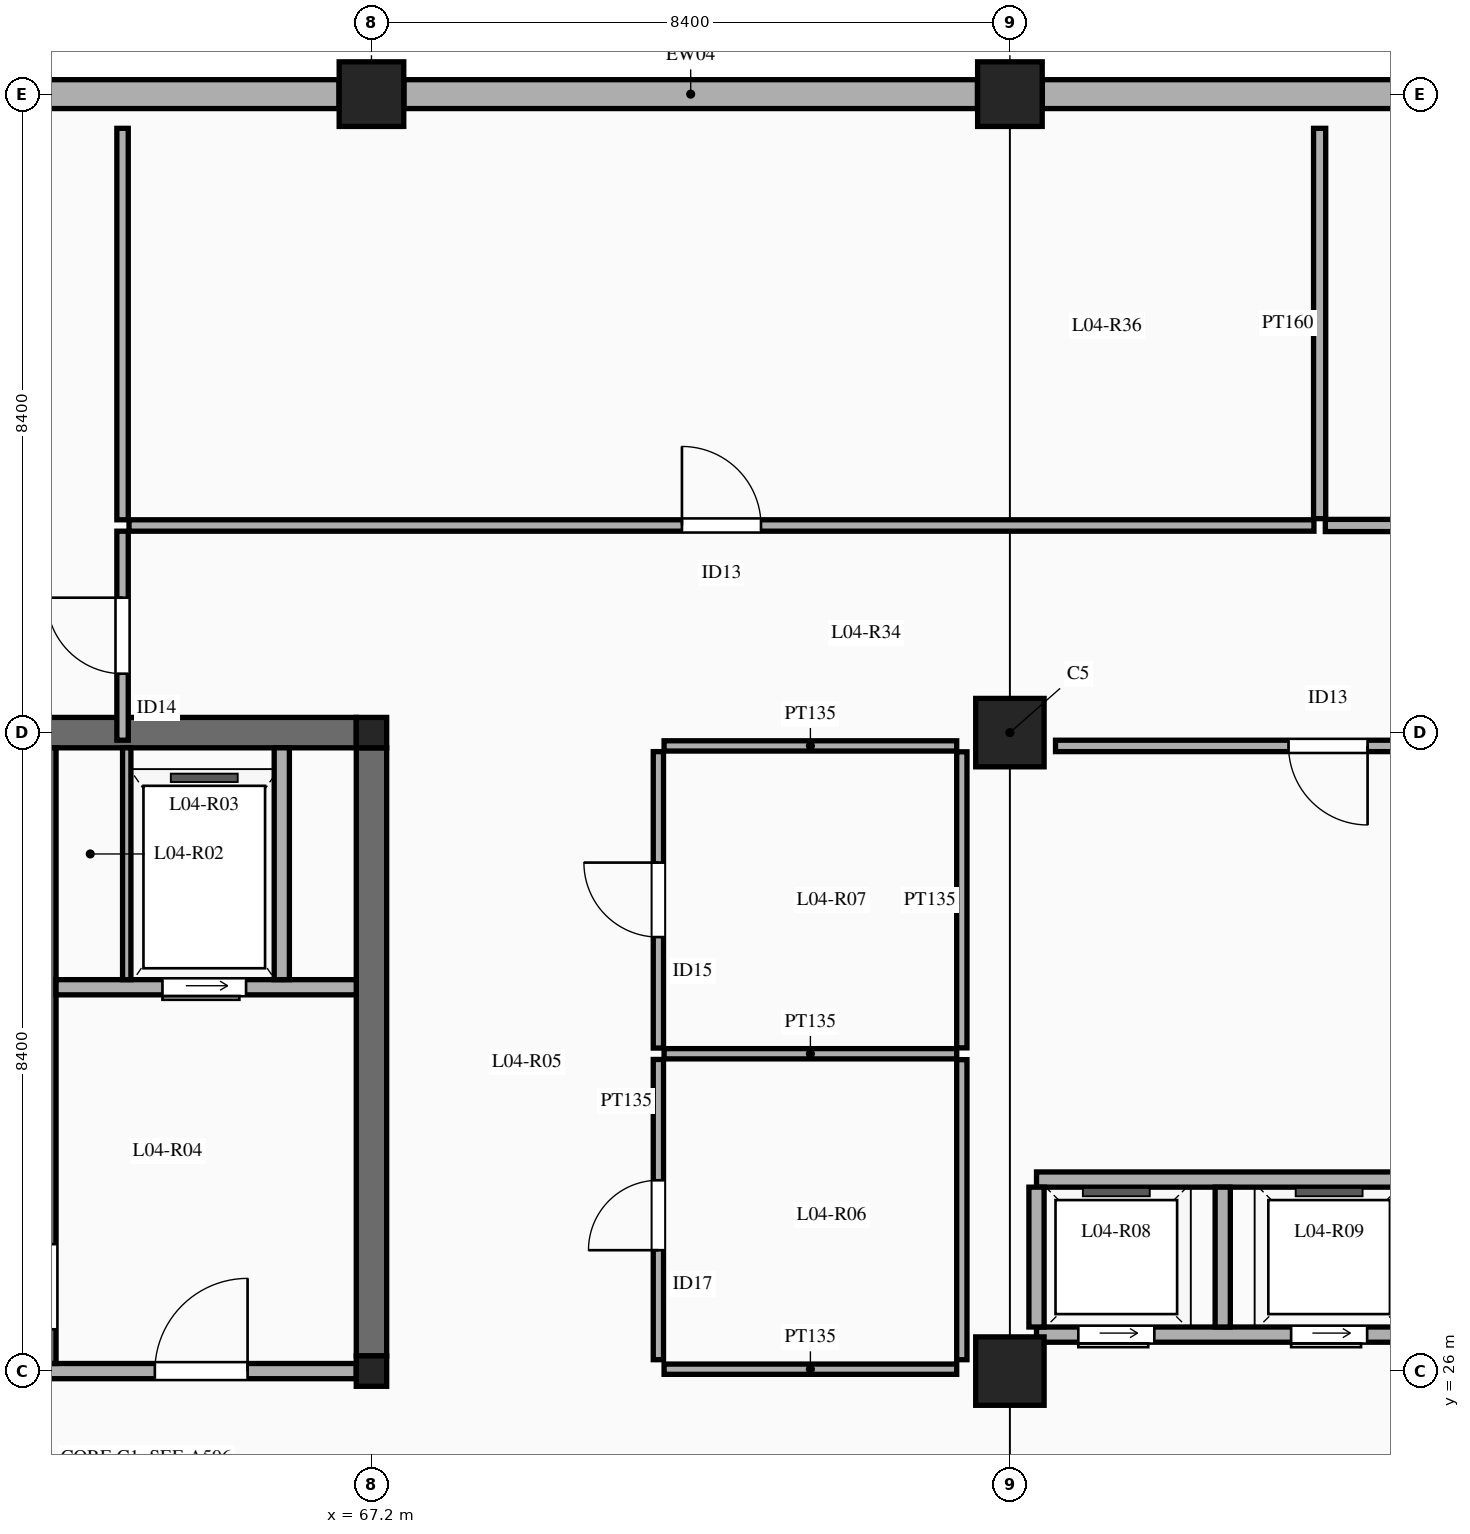
"""IFC4 building model, lengths in metres.
Left out: names, types, materials, properties, quantities, classifications, styles, units other than length and angle.
Written with IfcOpenShell. Run it as: python <this file> out.ifc"""

import sys

from ifc_helpers import new_model, si_unit, direction, frame, frame_2d, origin, origin_2d, place, context, subcontext, project, spatial, rectangle, extrude, element, fill, save


model = new_model("IFC4")
c1 = context("Model", 3, precision=1e-05, world=origin(), true_north=direction((0.0, 1.0)))
c2 = subcontext(c1, "Body", "Model", "MODEL_VIEW")
j1 = project(units=[si_unit("LENGTHUNIT", "METRE"), si_unit("PLANEANGLEUNIT", "RADIAN")], contexts=[c1])
p1 = place(None, origin())
s1 = spatial("IfcSite", under=j1, at=p1, CompositionType="ELEMENT")
p2 = place(p1, origin())
s2 = spatial("IfcBuilding", under=s1, at=p2, CompositionType="ELEMENT")
p3 = place(p2, frame((0.0, 0.0, 19.5)))
s3 = spatial("IfcBuildingStorey", under=s2, at=p3, CompositionType="ELEMENT", Elevation=19.5)
for number, where, z_axis, x_axis in (
    (1, (67.2, 26.0, 0.0), (0.0, 0.0, 1.0), (1.0, 0.0, 0.0)),
    (2, (67.2, 34.4, 0.0), (0.0, 0.0, 1.0), (1.0, 0.0, 0.0)),
):
    element("IfcColumn", number, at=place(p3, frame(where, z_axis=z_axis, x_axis=x_axis)), inside=s3, PredefinedType="COLUMN", context=c2, shape_type="SweptSolid", body=[
        extrude(rectangle(XDim=0.4, YDim=0.4, at=origin_2d()), origin(), (0.0, 0.0, 1.0), 4.5),
    ])
p4 = place(p3, frame((67.2, 42.8, 0.0), z_axis=(0.0, 0.0, 1.0), x_axis=(1.0, 0.0, 0.0)))
e3 = element("IfcColumn", 3, at=p4, inside=s3, PredefinedType="COLUMN", context=c2, shape_type="SweptSolid", body=[
    extrude(rectangle(XDim=0.85, YDim=0.85, at=origin_2d()), origin(), (0.0, 0.0, 1.0), 4.5),
])
for number, where, z_axis, x_axis in (
    (4, (75.6, 26.0, 0.0), (0.0, 0.0, 1.0), (1.0, 0.0, 0.0)),
    (5, (75.6, 34.4, 0.0), (0.0, 0.0, 1.0), (1.0, 0.0, 0.0)),
):
    element("IfcColumn", number, at=place(p3, frame(where, z_axis=z_axis, x_axis=x_axis)), inside=s3, PredefinedType="COLUMN", context=c2, shape_type="SweptSolid", body=[
        extrude(rectangle(XDim=0.9, YDim=0.9, at=origin_2d()), origin(), (0.0, 0.0, 1.0), 4.5),
    ])
p5 = place(p3, frame((75.6, 42.8, 0.0), z_axis=(0.0, 0.0, 1.0), x_axis=(1.0, 0.0, 0.0)))
e6 = element("IfcColumn", 6, at=p5, inside=s3, PredefinedType="COLUMN", context=c2, shape_type="SweptSolid", body=[
    extrude(rectangle(XDim=0.85, YDim=0.85, at=origin_2d()), origin(), (0.0, 0.0, 1.0), 4.5),
])
for number, where, z_axis, x_axis in (
    (7, (67.2, 26.2, 0.0), (0.0, 0.0, 1.0), (0.0, 1.0, 0.0)),
    (8, (59.0, 34.4, 0.0), (0.0, 0.0, 1.0), (1.0, 0.0, 0.0)),
):
    element("IfcWall", number, at=place(p3, frame(where, z_axis=z_axis, x_axis=x_axis)), inside=s3, PredefinedType="SHEAR", context=c2, shape_type="SweptSolid", body=[
        extrude(rectangle(XDim=8.0, YDim=0.4, at=frame_2d((4.0, 0.0))), origin(), (0.0, 0.0, 1.0), 4.5),
    ])
p6 = place(p3, frame((59.227, 42.8, 0.0), z_axis=(0.0, 0.0, 1.0), x_axis=(1.0, 0.0, 0.0)))
e9 = element("IfcWall", 9, at=p6, inside=s3, PredefinedType="SOLIDWALL", context=c2, shape_type="SweptSolid", body=[
    extrude(rectangle(XDim=7.546, YDim=0.38, at=frame_2d((3.773, 0.0))), origin(), (0.0, 0.0, 1.0), 3.55),
])
p7 = place(p3, frame((67.627, 42.8, 0.0), z_axis=(0.0, 0.0, 1.0), x_axis=(1.0, 0.0, 0.0)))
e10 = element("IfcWall", 10, at=p7, inside=s3, PredefinedType="SOLIDWALL", context=c2, shape_type="SweptSolid", body=[
    extrude(rectangle(XDim=7.546, YDim=0.38, at=frame_2d((3.773, 0.0))), origin(), (0.0, 0.0, 1.0), 3.55),
])
p8 = place(p3, frame((76.027, 42.8, 0.0), z_axis=(0.0, 0.0, 1.0), x_axis=(1.0, 0.0, 0.0)))
e11 = element("IfcWall", 11, at=p8, inside=s3, PredefinedType="SOLIDWALL", context=c2, shape_type="SweptSolid", body=[
    extrude(rectangle(XDim=7.546, YDim=0.38, at=frame_2d((3.773, 0.0))), origin(), (0.0, 0.0, 1.0), 3.55),
])
p9 = place(p3, frame((59.0, 26.0, 0.0), z_axis=(0.0, 0.0, 1.0), x_axis=(1.0, 0.0, 0.0)))
e12 = element("IfcWall", 12, at=p9, inside=s3, PredefinedType="SOLIDWALL", context=c2, shape_type="SweptSolid", body=[
    extrude(rectangle(XDim=8.0, YDim=0.2, at=frame_2d((4.0, 0.0))), origin(), (0.0, 0.0, 1.0), 3.53),
])
p10 = place(p9, frame((1.55, 0.0, 0.0)))
e13 = element("IfcOpeningElement", 13, at=p10, cuts=e12, PredefinedType="OPENING", context=c2, shape_type="SweptSolid", body=[
    extrude(rectangle(XDim=1.15, YDim=2.15, at=frame_2d((0.575, 1.075))), frame((0.0, 0.11, 0.0), z_axis=(0.0, -1.0, 0.0), x_axis=(1.0, 0.0, 0.0)), (0.0, 0.0, 1.0), 0.22),
])
p11 = place(p9, frame((5.35, 0.0, 0.0)))
e14 = element("IfcOpeningElement", 14, at=p11, cuts=e12, PredefinedType="OPENING", context=c2, shape_type="SweptSolid", body=[
    extrude(rectangle(XDim=1.22, YDim=2.15, at=frame_2d((0.61, 1.075))), frame((0.0, 0.11, 0.0), z_axis=(0.0, -1.0, 0.0), x_axis=(1.0, 0.0, 0.0)), (0.0, 0.0, 1.0), 0.22),
])
p12 = place(p3, frame((62.95, 26.1, 0.0), z_axis=(0.0, 0.0, 1.0), x_axis=(0.0, 1.0, 0.0)))
e15 = element("IfcWall", 15, at=p12, inside=s3, PredefinedType="SOLIDWALL", context=c2, shape_type="SweptSolid", body=[
    extrude(rectangle(XDim=8.1, YDim=0.2, at=frame_2d((4.05, 0.0))), origin(), (0.0, 0.0, 1.0), 4.25),
])
p13 = place(p12, frame((0.45, 0.0, 0.0)))
e16 = element("IfcOpeningElement", 16, at=p13, cuts=e15, PredefinedType="OPENING", context=c2, shape_type="SweptSolid", body=[
    extrude(rectangle(XDim=1.12, YDim=2.15, at=frame_2d((0.56, 1.075))), frame((0.0, 0.11, 0.0), z_axis=(0.0, -1.0, 0.0), x_axis=(1.0, 0.0, 0.0)), (0.0, 0.0, 1.0), 0.22),
])
p14 = place(p3, frame((63.05, 31.05, 0.0), z_axis=(0.0, 0.0, 1.0), x_axis=(1.0, 0.0, 0.0)))
e17 = element("IfcWall", 17, at=p14, inside=s3, PredefinedType="SOLIDWALL", context=c2, shape_type="SweptSolid", body=[
    extrude(rectangle(XDim=3.95, YDim=0.2, at=frame_2d((1.975, 0.0))), origin(), (0.0, 0.0, 1.0), 4.25),
])
p15 = place(p14, frame((1.4, 0.0, 0.0)))
e18 = element("IfcOpeningElement", 18, at=p15, cuts=e17, PredefinedType="OPENING", context=c2, shape_type="SweptSolid", body=[
    extrude(rectangle(XDim=1.1, YDim=2.15, at=frame_2d((0.55, 1.075))), frame((0.0, 0.11, 0.0), z_axis=(0.0, -1.0, 0.0), x_axis=(1.0, 0.0, 0.0)), (0.0, 0.0, 1.0), 0.22),
])
p16 = place(p3, frame((63.98, 31.15, 0.0), z_axis=(0.0, 0.0, 1.0), x_axis=(0.0, 1.0, 0.0)))
e19 = element("IfcWall", 19, at=p16, inside=s3, PredefinedType="PARTITIONING", context=c2, shape_type="SweptSolid", body=[
    extrude(rectangle(XDim=3.05, YDim=0.11, at=frame_2d((1.525, 0.0))), origin(), (0.0, 0.0, 1.0), 4.25),
])
p17 = place(p3, frame((66.02, 31.15, 0.0), z_axis=(0.0, 0.0, 1.0), x_axis=(0.0, 1.0, 0.0)))
e20 = element("IfcWall", 20, at=p17, inside=s3, PredefinedType="SOLIDWALL", context=c2, shape_type="SweptSolid", body=[
    extrude(rectangle(XDim=3.05, YDim=0.2, at=frame_2d((1.525, 0.0))), origin(), (0.0, 0.0, 1.0), 4.25),
])
p18 = place(p3, frame((75.95, 26.48, 0.0), z_axis=(0.0, 0.0, 1.0), x_axis=(1.0, 0.0, 0.0)))
e21 = element("IfcWall", 21, at=p18, inside=s3, PredefinedType="SOLIDWALL", context=c2, shape_type="SweptSolid", body=[
    extrude(rectangle(XDim=7.77, YDim=0.2, at=frame_2d((3.885, 0.0))), origin(), (0.0, 0.0, 1.0), 4.25),
])
p19 = place(p18, frame((0.55, 0.0, 0.0)))
e22 = element("IfcOpeningElement", 22, at=p19, cuts=e21, PredefinedType="OPENING", context=c2, shape_type="SweptSolid", body=[
    extrude(rectangle(XDim=1.0, YDim=2.15, at=frame_2d((0.5, 1.075))), frame((0.0, 0.11, 0.0), z_axis=(0.0, -1.0, 0.0), x_axis=(1.0, 0.0, 0.0)), (0.0, 0.0, 1.0), 0.22),
])
p20 = place(p18, frame((3.35, 0.0, 0.0)))
e23 = element("IfcOpeningElement", 23, at=p20, cuts=e21, PredefinedType="OPENING", context=c2, shape_type="SweptSolid", body=[
    extrude(rectangle(XDim=1.0, YDim=2.15, at=frame_2d((0.5, 1.075))), frame((0.0, 0.11, 0.0), z_axis=(0.0, -1.0, 0.0), x_axis=(1.0, 0.0, 0.0)), (0.0, 0.0, 1.0), 0.22),
])
p21 = place(p18, frame((6.15, 0.0, 0.0)))
e24 = element("IfcOpeningElement", 24, at=p21, cuts=e21, PredefinedType="OPENING", context=c2, shape_type="SweptSolid", body=[
    extrude(rectangle(XDim=1.0, YDim=2.15, at=frame_2d((0.5, 1.075))), frame((0.0, 0.11, 0.0), z_axis=(0.0, -1.0, 0.0), x_axis=(1.0, 0.0, 0.0)), (0.0, 0.0, 1.0), 0.22),
])
p22 = place(p3, frame((75.95, 28.52, 0.0), z_axis=(0.0, 0.0, 1.0), x_axis=(1.0, 0.0, 0.0)))
e25 = element("IfcWall", 25, at=p22, inside=s3, PredefinedType="SOLIDWALL", context=c2, shape_type="SweptSolid", body=[
    extrude(rectangle(XDim=7.77, YDim=0.2, at=frame_2d((3.885, 0.0))), origin(), (0.0, 0.0, 1.0), 4.25),
])
p23 = place(p3, frame((75.95, 26.58, 0.0), z_axis=(0.0, 0.0, 1.0), x_axis=(0.0, 1.0, 0.0)))
e26 = element("IfcWall", 26, at=p23, inside=s3, PredefinedType="SOLIDWALL", context=c2, shape_type="SweptSolid", body=[
    extrude(rectangle(XDim=1.84, YDim=0.2, at=frame_2d((0.92, 0.0))), origin(), (0.0, 0.0, 1.0), 3.68),
])
p24 = place(p3, frame((78.4, 26.58, 0.0), z_axis=(0.0, 0.0, 1.0), x_axis=(0.0, 1.0, 0.0)))
e27 = element("IfcWall", 27, at=p24, inside=s3, PredefinedType="SOLIDWALL", context=c2, shape_type="SweptSolid", body=[
    extrude(rectangle(XDim=1.84, YDim=0.2, at=frame_2d((0.92, 0.0))), origin(), (0.0, 0.0, 1.0), 4.25),
])
p25 = place(p3, frame((70.975, 26.15, 0.0), z_axis=(0.0, 0.0, 1.0), x_axis=(0.0, 1.0, 0.0)))
e28 = element("IfcWall", 28, at=p25, inside=s3, PredefinedType="PARTITIONING", context=c2, shape_type="SweptSolid", body=[
    extrude(rectangle(XDim=3.95, YDim=0.135, at=frame_2d((1.975, 0.0))), origin(), (0.0, 0.0, 1.0), 3.45),
])
p26 = place(p25, frame((1.441, 0.0, 0.0)))
e29 = element("IfcOpeningElement", 29, at=p26, cuts=e28, PredefinedType="OPENING", context=c2, shape_type="SweptSolid", body=[
    extrude(rectangle(XDim=0.92, YDim=2.12, at=frame_2d((0.46, 1.06))), frame((0.0, 0.077, 0.0), z_axis=(0.0, -1.0, 0.0), x_axis=(1.0, 0.0, 0.0)), (0.0, 0.0, 1.0), 0.155),
])
p27 = place(p3, frame((70.975, 30.25, 0.0), z_axis=(0.0, 0.0, 1.0), x_axis=(0.0, 1.0, 0.0)))
e30 = element("IfcWall", 30, at=p27, inside=s3, PredefinedType="PARTITIONING", context=c2, shape_type="SweptSolid", body=[
    extrude(rectangle(XDim=3.9, YDim=0.135, at=frame_2d((1.95, 0.0))), origin(), (0.0, 0.0, 1.0), 3.45),
])
p28 = place(p27, frame((1.46, 0.0, 0.0)))
e31 = element("IfcOpeningElement", 31, at=p28, cuts=e30, PredefinedType="OPENING", context=c2, shape_type="SweptSolid", body=[
    extrude(rectangle(XDim=0.98, YDim=2.15, at=frame_2d((0.49, 1.075))), frame((0.0, 0.077, 0.0), z_axis=(0.0, -1.0, 0.0), x_axis=(1.0, 0.0, 0.0)), (0.0, 0.0, 1.0), 0.155),
])
for number, where, z_axis, x_axis in (
    (32, (71.05, 30.175, 0.0), (0.0, 0.0, 1.0), (1.0, 0.0, 0.0)),
    (33, (71.05, 26.025, 0.0), (0.0, 0.0, 1.0), (1.0, 0.0, 0.0)),
    (34, (71.05, 34.225, 0.0), (0.0, 0.0, 1.0), (1.0, 0.0, 0.0)),
):
    element("IfcWall", number, at=place(p3, frame(where, z_axis=z_axis, x_axis=x_axis)), inside=s3, PredefinedType="PARTITIONING", context=c2, shape_type="SweptSolid", body=[
        extrude(rectangle(XDim=3.85, YDim=0.135, at=frame_2d((1.925, 0.0))), origin(), (0.0, 0.0, 1.0), 3.45),
    ])
p29 = place(p3, frame((76.2, 34.225, 0.0), z_axis=(0.0, 0.0, 1.0), x_axis=(1.0, 0.0, 0.0)))
e35 = element("IfcWall", 35, at=p29, inside=s3, PredefinedType="PARTITIONING", context=c2, shape_type="SweptSolid", body=[
    extrude(rectangle(XDim=7.32, YDim=0.15, at=frame_2d((3.66, 0.0))), origin(), (0.0, 0.0, 1.0), 3.45),
])
p30 = place(p29, frame((3.066, 0.0, 0.0)))
e36 = element("IfcOpeningElement", 36, at=p30, cuts=e35, PredefinedType="OPENING", context=c2, shape_type="SweptSolid", body=[
    extrude(rectangle(XDim=1.04, YDim=2.15, at=frame_2d((0.52, 1.075))), frame((0.0, 0.085, 0.0), z_axis=(0.0, -1.0, 0.0), x_axis=(1.0, 0.0, 0.0)), (0.0, 0.0, 1.0), 0.17),
])
p31 = place(p3, frame((63.925, 34.3, 0.0), z_axis=(0.0, 0.0, 1.0), x_axis=(0.0, 1.0, 0.0)))
e37 = element("IfcWall", 37, at=p31, inside=s3, PredefinedType="PARTITIONING", context=c2, shape_type="SweptSolid", body=[
    extrude(rectangle(XDim=2.75, YDim=0.15, at=frame_2d((1.375, 0.0))), origin(), (0.0, 0.0, 1.0), 3.45),
])
p32 = place(p31, frame((0.875, 0.0, 0.0)))
e38 = element("IfcOpeningElement", 38, at=p32, cuts=e37, PredefinedType="OPENING", context=c2, shape_type="SweptSolid", body=[
    extrude(rectangle(XDim=1.0, YDim=2.15, at=frame_2d((0.5, 1.075))), frame((0.0, 0.085, 0.0), z_axis=(0.0, -1.0, 0.0), x_axis=(1.0, 0.0, 0.0)), (0.0, 0.0, 1.0), 0.17),
])
p33 = place(p3, frame((64.01, 37.125, 0.0), z_axis=(0.0, 0.0, 1.0), x_axis=(1.0, 0.0, 0.0)))
e39 = element("IfcWall", 39, at=p33, inside=s3, PredefinedType="PARTITIONING", context=c2, shape_type="SweptSolid", body=[
    extrude(rectangle(XDim=15.59, YDim=0.15, at=frame_2d((7.795, 0.0))), origin(), (0.0, 0.0, 1.0), 3.45),
])
p34 = place(p33, frame((7.275, 0.0, 0.0)))
e40 = element("IfcOpeningElement", 40, at=p34, cuts=e39, PredefinedType="OPENING", context=c2, shape_type="SweptSolid", body=[
    extrude(rectangle(XDim=1.04, YDim=2.15, at=frame_2d((0.52, 1.075))), frame((0.0, 0.085, 0.0), z_axis=(0.0, -1.0, 0.0), x_axis=(1.0, 0.0, 0.0)), (0.0, 0.0, 1.0), 0.17),
])
p35 = place(p3, frame((79.75, 37.125, 0.0), z_axis=(0.0, 0.0, 1.0), x_axis=(1.0, 0.0, 0.0)))
e41 = element("IfcWall", 41, at=p35, inside=s3, PredefinedType="PARTITIONING", context=c2, shape_type="SweptSolid", body=[
    extrude(rectangle(XDim=15.65, YDim=0.16, at=frame_2d((7.825, 0.0))), origin(), (0.0, 0.0, 1.0), 3.45),
])
p36 = place(p35, frame((7.18, 0.0, 0.0)))
e42 = element("IfcOpeningElement", 42, at=p36, cuts=e41, PredefinedType="OPENING", context=c2, shape_type="SweptSolid", body=[
    extrude(rectangle(XDim=1.14, YDim=2.22, at=frame_2d((0.57, 1.11))), frame((0.0, 0.09, 0.0), z_axis=(0.0, -1.0, 0.0), x_axis=(1.0, 0.0, 0.0)), (0.0, 0.0, 1.0), 0.18),
])
p37 = place(p3, frame((63.925, 37.2, 0.0), z_axis=(0.0, 0.0, 1.0), x_axis=(0.0, 1.0, 0.0)))
e43 = element("IfcWall", 43, at=p37, inside=s3, PredefinedType="PARTITIONING", context=c2, shape_type="SweptSolid", body=[
    extrude(rectangle(XDim=5.15, YDim=0.15, at=frame_2d((2.575, 0.0))), origin(), (0.0, 0.0, 1.0), 3.45),
])
p38 = place(p3, frame((79.675, 37.215, 0.0), z_axis=(0.0, 0.0, 1.0), x_axis=(0.0, 1.0, 0.0)))
e44 = element("IfcWall", 44, at=p38, inside=s3, PredefinedType="PARTITIONING", context=c2, shape_type="SweptSolid", body=[
    extrude(rectangle(XDim=5.135, YDim=0.16, at=frame_2d((2.567, 0.0))), origin(), (0.0, 0.0, 1.0), 3.45),
])
p39 = place(p3, frame((74.968, 26.15, 0.0), z_axis=(0.0, 0.0, 1.0), x_axis=(0.0, 1.0, 0.0)))
e45 = element("IfcWall", 45, at=p39, inside=s3, PredefinedType="PARTITIONING", context=c2, shape_type="SweptSolid", body=[
    extrude(rectangle(XDim=3.948, YDim=0.135, at=frame_2d((1.974, 0.0))), origin(), (0.0, 0.0, 1.0), 3.45),
])
p40 = place(p3, frame((74.968, 30.252, 0.0), z_axis=(0.0, 0.0, 1.0), x_axis=(0.0, 1.0, 0.0)))
e46 = element("IfcWall", 46, at=p40, inside=s3, PredefinedType="PARTITIONING", context=c2, shape_type="SweptSolid", body=[
    extrude(rectangle(XDim=3.895, YDim=0.135, at=frame_2d((1.948, 0.0))), origin(), (0.0, 0.0, 1.0), 3.45),
])
p41 = place(p11, origin())
e47 = element("IfcDoor", 47, at=p41, inside=s3, OperationType="SINGLE_SWING_RIGHT", PredefinedType="DOOR", context=c2, shape_type="SweptSolid", body=[
    extrude(rectangle(XDim=1.22, YDim=2.15, at=frame_2d((0.61, 1.075))), frame((0.0, 0.025, 0.0), z_axis=(0.0, -1.0, 0.0), x_axis=(1.0, 0.0, 0.0)), (0.0, 0.0, 1.0), 0.05),
])
fill(e14, e47)
p42 = place(p15, frame((1.1, 0.0, 0.0), z_axis=(0.0, 0.0, 1.0), x_axis=(-1.0, 0.0, 0.0)))
e48 = element("IfcDoor", 48, at=p42, inside=s3, OperationType="SLIDING_TO_LEFT", PredefinedType="DOOR", context=c2, shape_type="SweptSolid", body=[
    extrude(rectangle(XDim=1.1, YDim=2.15, at=frame_2d((0.55, 1.075))), frame((0.0, 0.025, 0.0), z_axis=(0.0, -1.0, 0.0), x_axis=(1.0, 0.0, 0.0)), (0.0, 0.0, 1.0), 0.05),
])
fill(e18, e48)
p43 = place(p19, frame((1.0, 0.0, 0.0), z_axis=(0.0, 0.0, 1.0), x_axis=(-1.0, 0.0, 0.0)))
e49 = element("IfcDoor", 49, at=p43, inside=s3, OperationType="SLIDING_TO_LEFT", PredefinedType="DOOR", context=c2, shape_type="SweptSolid", body=[
    extrude(rectangle(XDim=1.0, YDim=2.15, at=frame_2d((0.5, 1.075))), frame((0.0, 0.025, 0.0), z_axis=(0.0, -1.0, 0.0), x_axis=(1.0, 0.0, 0.0)), (0.0, 0.0, 1.0), 0.05),
])
fill(e22, e49)
p44 = place(p20, frame((1.0, 0.0, 0.0), z_axis=(0.0, 0.0, 1.0), x_axis=(-1.0, 0.0, 0.0)))
e50 = element("IfcDoor", 50, at=p44, inside=s3, OperationType="SLIDING_TO_LEFT", PredefinedType="DOOR", context=c2, shape_type="SweptSolid", body=[
    extrude(rectangle(XDim=1.0, YDim=2.15, at=frame_2d((0.5, 1.075))), frame((0.0, 0.025, 0.0), z_axis=(0.0, -1.0, 0.0), x_axis=(1.0, 0.0, 0.0)), (0.0, 0.0, 1.0), 0.05),
])
fill(e23, e50)
p45 = place(p26, origin())
e51 = element("IfcDoor", 51, at=p45, inside=s3, OperationType="SINGLE_SWING_LEFT", PredefinedType="DOOR", context=c2, shape_type="SweptSolid", body=[
    extrude(rectangle(XDim=0.92, YDim=2.12, at=frame_2d((0.46, 1.06))), frame((0.0, 0.025, 0.0), z_axis=(0.0, -1.0, 0.0), x_axis=(1.0, 0.0, 0.0)), (0.0, 0.0, 1.0), 0.05),
])
fill(e29, e51)
p46 = place(p28, origin())
e52 = element("IfcDoor", 52, at=p46, inside=s3, OperationType="SINGLE_SWING_RIGHT", PredefinedType="DOOR", context=c2, shape_type="SweptSolid", body=[
    extrude(rectangle(XDim=0.98, YDim=2.15, at=frame_2d((0.49, 1.075))), frame((0.0, 0.025, 0.0), z_axis=(0.0, -1.0, 0.0), x_axis=(1.0, 0.0, 0.0)), (0.0, 0.0, 1.0), 0.05),
])
fill(e31, e52)
p47 = place(p30, frame((1.04, 0.0, 0.0), z_axis=(0.0, 0.0, 1.0), x_axis=(-1.0, 0.0, 0.0)))
e53 = element("IfcDoor", 53, at=p47, inside=s3, OperationType="SINGLE_SWING_LEFT", PredefinedType="DOOR", context=c2, shape_type="SweptSolid", body=[
    extrude(rectangle(XDim=1.04, YDim=2.15, at=frame_2d((0.52, 1.075))), frame((0.0, 0.025, 0.0), z_axis=(0.0, -1.0, 0.0), x_axis=(1.0, 0.0, 0.0)), (0.0, 0.0, 1.0), 0.05),
])
fill(e36, e53)
p48 = place(p32, origin())
e54 = element("IfcDoor", 54, at=p48, inside=s3, OperationType="SINGLE_SWING_RIGHT", PredefinedType="DOOR", context=c2, shape_type="SweptSolid", body=[
    extrude(rectangle(XDim=1.0, YDim=2.15, at=frame_2d((0.5, 1.075))), frame((0.0, 0.025, 0.0), z_axis=(0.0, -1.0, 0.0), x_axis=(1.0, 0.0, 0.0)), (0.0, 0.0, 1.0), 0.05),
])
fill(e38, e54)
p49 = place(p34, origin())
e55 = element("IfcDoor", 55, at=p49, inside=s3, OperationType="SINGLE_SWING_LEFT", PredefinedType="DOOR", context=c2, shape_type="SweptSolid", body=[
    extrude(rectangle(XDim=1.04, YDim=2.15, at=frame_2d((0.52, 1.075))), frame((0.0, 0.025, 0.0), z_axis=(0.0, -1.0, 0.0), x_axis=(1.0, 0.0, 0.0)), (0.0, 0.0, 1.0), 0.05),
])
fill(e40, e55)
save(model, sys.argv[1])
